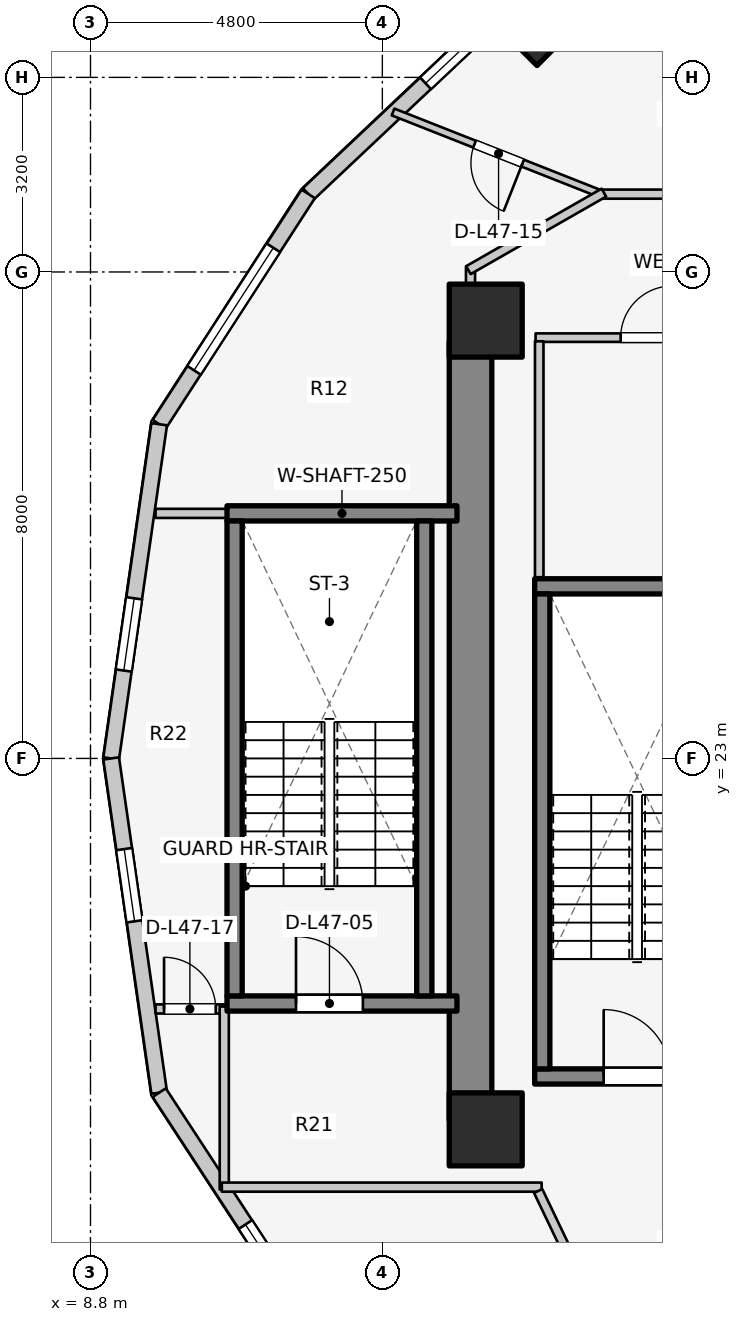
"""IFC4 building model, lengths in metres.
Left out: names, types, materials, properties, quantities, classifications, styles, units other than length and angle.
Written with IfcOpenShell. Run it as: python <this file> out.ifc"""

import sys

from ifc_helpers import new_model, si_unit, direction, frame, frame_2d, origin, origin_2d, place, context, subcontext, project, spatial, rectangle, extrude, element, fill, save


model = new_model("IFC4")
c1 = context("Model", 3, precision=1e-05, world=origin(), true_north=direction((0.0, 1.0)))
c2 = subcontext(c1, "Body", "Model", "MODEL_VIEW")
j1 = project(units=[si_unit("LENGTHUNIT", "METRE"), si_unit("PLANEANGLEUNIT", "RADIAN")], contexts=[c1])
p1 = place(None, origin())
s1 = spatial("IfcSite", under=j1, at=p1, CompositionType="ELEMENT")
p2 = place(p1, origin())
s2 = spatial("IfcBuilding", under=s1, at=p2, CompositionType="ELEMENT")
p3 = place(p2, frame((0.0, 0.0, 156.0)))
s3 = spatial("IfcBuildingStorey", under=s2, at=p3, CompositionType="ELEMENT", Elevation=156.0)
p4 = place(p3, frame((15.05, 17.05, 0.0), z_axis=(0.0, 0.0, 1.0), x_axis=(0.0, 1.0, 0.0)))
e1 = element("IfcWall", 1, at=p4, inside=s3, PredefinedType="SHEAR", context=c2, shape_type="SweptSolid", body=[
    extrude(rectangle(XDim=12.8, YDim=0.7, at=frame_2d((6.4, 0.0))), origin(), (0.0, 0.0, 1.0), 3.1),
])
p5 = place(p3, frame((16.105, 17.77, 0.0), z_axis=(0.0, 0.0, 1.0), x_axis=(1.0, 0.0, 0.0)))
e2 = element("IfcWall", 2, at=p5, inside=s3, PredefinedType="SOLIDWALL", context=c2, shape_type="SweptSolid", body=[
    extrude(rectangle(XDim=3.37, YDim=0.25, at=frame_2d((1.685, 0.0))), origin(), (0.0, 0.0, 1.0), 3.1),
])
p6 = place(p5, frame((1.135, 0.0, 0.0)))
e3 = element("IfcOpeningElement", 3, at=p6, cuts=e2, PredefinedType="OPENING", context=c2, shape_type="SweptSolid", body=[
    extrude(rectangle(XDim=1.1, YDim=2.1, at=frame_2d((0.55, 1.05))), frame((0.0, 0.135, 0.0), z_axis=(0.0, -1.0, 0.0), x_axis=(1.0, 0.0, 0.0)), (0.0, 0.0, 1.0), 0.27),
])
p7 = place(p3, frame((16.105, 25.83, 0.0), z_axis=(0.0, 0.0, 1.0), x_axis=(1.0, 0.0, 0.0)))
e4 = element("IfcWall", 4, at=p7, inside=s3, PredefinedType="SOLIDWALL", context=c2, shape_type="SweptSolid", body=[
    extrude(rectangle(XDim=3.37, YDim=0.25, at=frame_2d((1.685, 0.0))), origin(), (0.0, 0.0, 1.0), 3.1),
])
p8 = place(p3, frame((16.23, 17.895, 0.0), z_axis=(0.0, 0.0, 1.0), x_axis=(0.0, 1.0, 0.0)))
e5 = element("IfcWall", 5, at=p8, inside=s3, PredefinedType="SOLIDWALL", context=c2, shape_type="SweptSolid", body=[
    extrude(rectangle(XDim=7.81, YDim=0.25, at=frame_2d((3.905, 0.0))), origin(), (0.0, 0.0, 1.0), 3.1),
])
p9 = place(p3, frame((11.045, 18.97, 0.0), z_axis=(0.0, 0.0, 1.0), x_axis=(1.0, 0.0, 0.0)))
e6 = element("IfcWall", 6, at=p9, inside=s3, PredefinedType="SOLIDWALL", context=c2, shape_type="SweptSolid", body=[
    extrude(rectangle(XDim=3.782, YDim=0.25, at=frame_2d((1.891, 0.0))), origin(), (0.0, 0.0, 1.0), 3.1),
])
p10 = place(p9, frame((1.135, 0.0, 0.0)))
e7 = element("IfcOpeningElement", 7, at=p10, cuts=e6, PredefinedType="OPENING", context=c2, shape_type="SweptSolid", body=[
    extrude(rectangle(XDim=1.1, YDim=2.1, at=frame_2d((0.55, 1.05))), frame((0.0, 0.135, 0.0), z_axis=(0.0, -1.0, 0.0), x_axis=(1.0, 0.0, 0.0)), (0.0, 0.0, 1.0), 0.27),
])
p11 = place(p3, frame((11.045, 27.03, 0.0), z_axis=(0.0, 0.0, 1.0), x_axis=(1.0, 0.0, 0.0)))
e8 = element("IfcWall", 8, at=p11, inside=s3, PredefinedType="SOLIDWALL", context=c2, shape_type="SweptSolid", body=[
    extrude(rectangle(XDim=3.782, YDim=0.25, at=frame_2d((1.891, 0.0))), origin(), (0.0, 0.0, 1.0), 3.1),
])
for number, where, z_axis, x_axis in (
    (9, (11.17, 19.095, 0.0), (0.0, 0.0, 1.0), (0.0, 1.0, 0.0)),
    (10, (14.29, 19.095, 0.0), (0.0, 0.0, 1.0), (0.0, 1.0, 0.0)),
):
    element("IfcWall", number, at=place(p3, frame(where, z_axis=z_axis, x_axis=x_axis)), inside=s3, PredefinedType="SOLIDWALL", context=c2, shape_type="SweptSolid", body=[
        extrude(rectangle(XDim=7.81, YDim=0.25, at=frame_2d((3.905, 0.0))), origin(), (0.0, 0.0, 1.0), 3.1),
    ])
for number, where, z_axis, x_axis in (
    (11, (15.3, 16.9, 0.0), (0.0, 0.0, 1.0), (1.0, 0.0, 0.0)),
    (12, (15.3, 30.2, 0.0), (0.0, 0.0, 1.0), (1.0, 0.0, 0.0)),
):
    element("IfcColumn", number, at=place(p3, frame(where, z_axis=z_axis, x_axis=x_axis)), inside=s3, PredefinedType="COLUMN", context=c2, shape_type="SweptSolid", body=[
        extrude(rectangle(XDim=1.2, YDim=1.2, at=origin_2d()), origin(), (0.0, 0.0, 1.0), 3.1),
    ])
p12 = place(p3, frame((16.143, 35.031, 0.0), z_axis=(0.0, 0.0, 1.0), x_axis=(-0.707106781187, 0.707106781187, 0.0)))
e13 = element("IfcColumn", 13, at=p12, inside=s3, PredefinedType="COLUMN", context=c2, shape_type="SweptSolid", body=[
    extrude(rectangle(XDim=0.9, YDim=0.9, at=origin_2d()), origin(), (0.0, 0.0, 1.0), 3.1),
])
p13 = place(p3, frame((15.731, 35.441, 0.0), z_axis=(0.0, 0.0, 1.0), x_axis=(-0.727667301037, -0.68593024354, 0.0)))
e14 = element("IfcWall", 14, at=p13, inside=s3, PredefinedType="STANDARD", context=c2, shape_type="SweptSolid", body=[
    extrude(rectangle(XDim=4.604, YDim=0.26, at=frame_2d((2.302, 0.0))), origin(), (0.0, 0.0, 1.0), 2.85),
])
p14 = place(p13, frame((0.751, 0.0, 0.75)))
e15 = element("IfcOpeningElement", 15, at=p14, cuts=e14, PredefinedType="OPENING", context=c2, shape_type="SweptSolid", body=[
    extrude(rectangle(XDim=1.2, YDim=1.5, at=frame_2d((0.6, 0.75))), frame((0.0, 0.14, 0.0), z_axis=(0.0, -1.0, 0.0), x_axis=(1.0, 0.0, 0.0)), (0.0, 0.0, 1.0), 0.28),
])
p15 = place(p3, frame((12.381, 32.284, 0.0), z_axis=(0.0, 0.0, 1.0), x_axis=(-0.543358984534, -0.839500454989, 0.0)))
e16 = element("IfcWall", 16, at=p15, inside=s3, PredefinedType="STANDARD", context=c2, shape_type="SweptSolid", body=[
    extrude(rectangle(XDim=4.511, YDim=0.26, at=frame_2d((2.256, 0.0))), origin(), (0.0, 0.0, 1.0), 2.85),
])
p16 = place(p15, frame((1.056, 0.0, 0.75)))
e17 = element("IfcOpeningElement", 17, at=p16, cuts=e16, PredefinedType="OPENING", context=c2, shape_type="SweptSolid", body=[
    extrude(rectangle(XDim=2.4, YDim=1.7, at=frame_2d((1.2, 0.85))), frame((0.0, 0.14, 0.0), z_axis=(0.0, -1.0, 0.0), x_axis=(1.0, 0.0, 0.0)), (0.0, 0.0, 1.0), 0.28),
])
p17 = place(p3, frame((9.93, 28.497, 0.0), z_axis=(0.0, 0.0, 1.0), x_axis=(-0.142227632286, -0.989833976288, 0.0)))
e18 = element("IfcWall", 18, at=p17, inside=s3, PredefinedType="STANDARD", context=c2, shape_type="SweptSolid", body=[
    extrude(rectangle(XDim=5.553, YDim=0.26, at=frame_2d((2.776, 0.0))), origin(), (0.0, 0.0, 1.0), 2.85),
])
p18 = place(p17, frame((2.892, 0.0, 0.75)))
e19 = element("IfcOpeningElement", 19, at=p18, cuts=e18, PredefinedType="OPENING", context=c2, shape_type="SweptSolid", body=[
    extrude(rectangle(XDim=1.2, YDim=1.5, at=frame_2d((0.6, 0.75))), frame((0.0, 0.14, 0.0), z_axis=(0.0, -1.0, 0.0), x_axis=(1.0, 0.0, 0.0)), (0.0, 0.0, 1.0), 0.28),
])
p19 = place(p3, frame((9.14, 23.0, 0.0), z_axis=(0.0, 0.0, 1.0), x_axis=(0.142227632286, -0.989833976288, 0.0)))
e20 = element("IfcWall", 20, at=p19, inside=s3, PredefinedType="STANDARD", context=c2, shape_type="SweptSolid", body=[
    extrude(rectangle(XDim=5.553, YDim=0.26, at=frame_2d((2.776, 0.0))), origin(), (0.0, 0.0, 1.0), 2.85),
])
p20 = place(p19, frame((1.506, 0.0, 0.75)))
e21 = element("IfcOpeningElement", 21, at=p20, cuts=e20, PredefinedType="OPENING", context=c2, shape_type="SweptSolid", body=[
    extrude(rectangle(XDim=1.2, YDim=1.5, at=frame_2d((0.6, 0.75))), frame((0.0, 0.14, 0.0), z_axis=(0.0, -1.0, 0.0), x_axis=(1.0, 0.0, 0.0)), (0.0, 0.0, 1.0), 0.28),
])
p21 = place(p3, frame((9.93, 17.503, 0.0), z_axis=(0.0, 0.0, 1.0), x_axis=(0.547456494366, -0.836834145322, 0.0)))
e22 = element("IfcWall", 22, at=p21, inside=s3, PredefinedType="STANDARD", context=c2, shape_type="SweptSolid", body=[
    extrude(rectangle(XDim=4.477, YDim=0.26, at=frame_2d((2.239, 0.0))), origin(), (0.0, 0.0, 1.0), 2.85),
])
p22 = place(p21, frame((2.591, 0.0, 0.75)))
e23 = element("IfcOpeningElement", 23, at=p22, cuts=e22, PredefinedType="OPENING", context=c2, shape_type="SweptSolid", body=[
    extrude(rectangle(XDim=1.2, YDim=1.5, at=frame_2d((0.6, 0.75))), frame((0.0, 0.14, 0.0), z_axis=(0.0, -1.0, 0.0), x_axis=(1.0, 0.0, 0.0)), (0.0, 0.0, 1.0), 0.28),
])
p23 = place(p3, frame((16.12, 29.92, 0.0), z_axis=(0.0, 0.0, 1.0), x_axis=(1.0, 0.0, 0.0)))
e24 = element("IfcWall", 24, at=p23, inside=s3, PredefinedType="PLUMBINGWALL", context=c2, shape_type="SweptSolid", body=[
    extrude(rectangle(XDim=3.3, YDim=0.14, at=frame_2d((1.65, 0.0))), origin(), (0.0, 0.0, 1.0), 2.855),
])
p24 = place(p23, frame((1.399, 0.0, 0.0)))
e25 = element("IfcOpeningElement", 25, at=p24, cuts=e24, PredefinedType="OPENING", context=c2, shape_type="SweptSolid", body=[
    extrude(rectangle(XDim=0.85, YDim=2.05, at=frame_2d((0.425, 1.025))), frame((0.0, 0.08, 0.0), z_axis=(0.0, -1.0, 0.0), x_axis=(1.0, 0.0, 0.0)), (0.0, 0.0, 1.0), 0.16),
])
p25 = place(p3, frame((16.18, 25.98, 0.0), z_axis=(0.0, 0.0, 1.0), x_axis=(0.0, 1.0, 0.0)))
e26 = element("IfcWall", 26, at=p25, inside=s3, PredefinedType="PLUMBINGWALL", context=c2, shape_type="SweptSolid", body=[
    extrude(rectangle(XDim=3.88, YDim=0.14, at=frame_2d((1.94, 0.0))), origin(), (0.0, 0.0, 1.0), 2.855),
])
p26 = place(p3, frame((9.87, 27.03, 0.0), z_axis=(0.0, 0.0, 1.0), x_axis=(1.0, 0.0, 0.0)))
e27 = element("IfcWall", 27, at=p26, inside=s3, PredefinedType="PARTITIONING", context=c2, shape_type="SweptSolid", body=[
    extrude(rectangle(XDim=1.17, YDim=0.15, at=frame_2d((0.585, 0.0))), origin(), (0.0, 0.0, 1.0), 2.855),
])
p27 = place(p3, frame((15.05, 29.8, 0.0), z_axis=(0.0, 0.0, 1.0), x_axis=(0.0, 1.0, 0.0)))
e28 = element("IfcWall", 28, at=p27, inside=s3, PredefinedType="PARTITIONING", context=c2, shape_type="SweptSolid", body=[
    extrude(rectangle(XDim=1.29, YDim=0.15, at=frame_2d((0.645, 0.0))), origin(), (0.0, 0.0, 1.0), 2.855),
])
p28 = place(p3, frame((17.247, 32.262, 0.0), z_axis=(0.0, 0.0, 1.0), x_axis=(-0.930204027108, 0.367042869367, 0.0)))
e29 = element("IfcWall", 29, at=p28, inside=s3, PredefinedType="MOVABLE", context=c2, shape_type="SweptSolid", body=[
    extrude(rectangle(XDim=3.731, YDim=0.12, at=frame_2d((1.865, 0.0))), origin(), (0.0, 0.0, 1.0), 2.22),
])
p29 = place(p28, frame((1.44, 0.0, 0.0)))
e30 = element("IfcOpeningElement", 30, at=p29, cuts=e29, PredefinedType="OPENING", context=c2, shape_type="SweptSolid", body=[
    extrude(rectangle(XDim=0.85, YDim=2.05, at=frame_2d((0.425, 1.025))), frame((0.0, 0.07, 0.0), z_axis=(0.0, -1.0, 0.0), x_axis=(1.0, 0.0, 0.0)), (0.0, 0.0, 1.0), 0.14),
])
p30 = place(p3, frame((17.15, 32.28, 0.0), z_axis=(0.0, 0.0, 1.0), x_axis=(1.0, 0.0, 0.0)))
e31 = element("IfcWall", 31, at=p30, inside=s3, PredefinedType="PARTITIONING", context=c2, shape_type="SweptSolid", body=[
    extrude(rectangle(XDim=7.52, YDim=0.15, at=frame_2d((3.76, 0.0))), origin(), (0.0, 0.0, 1.0), 2.299),
])
p31 = place(p30, frame((1.3, 0.0, 0.0)))
e32 = element("IfcOpeningElement", 32, at=p31, cuts=e31, PredefinedType="OPENING", context=c2, shape_type="SweptSolid", body=[
    extrude(rectangle(XDim=0.9, YDim=2.1, at=frame_2d((0.45, 1.05))), frame((0.0, 0.085, 0.0), z_axis=(0.0, -1.0, 0.0), x_axis=(1.0, 0.0, 0.0)), (0.0, 0.0, 1.0), 0.17),
])
p32 = place(p3, frame((17.243, 32.305, 0.0), z_axis=(0.0, 0.0, 1.0), x_axis=(-0.867991349648, -0.496579315857, 0.0)))
e33 = element("IfcWall", 33, at=p32, inside=s3, PredefinedType="PARTITIONING", context=c2, shape_type="SweptSolid", body=[
    extrude(rectangle(XDim=2.567, YDim=0.15, at=frame_2d((1.283, 0.0))), origin(), (0.0, 0.0, 1.0), 2.22),
])
p33 = place(p3, frame((9.87, 18.88, 0.0), z_axis=(0.0, 0.0, 1.0), x_axis=(1.0, 0.0, 0.0)))
e34 = element("IfcWall", 34, at=p33, inside=s3, PredefinedType="PARTITIONING", context=c2, shape_type="SweptSolid", body=[
    extrude(rectangle(XDim=1.17, YDim=0.15, at=frame_2d((0.585, 0.0))), origin(), (0.0, 0.0, 1.0), 2.855),
])
p34 = place(p33, frame((0.14, 0.0, 0.0)))
e35 = element("IfcOpeningElement", 35, at=p34, cuts=e34, PredefinedType="OPENING", context=c2, shape_type="SweptSolid", body=[
    extrude(rectangle(XDim=0.85, YDim=2.05, at=frame_2d((0.425, 1.025))), frame((0.0, 0.085, 0.0), z_axis=(0.0, -1.0, 0.0), x_axis=(1.0, 0.0, 0.0)), (0.0, 0.0, 1.0), 0.17),
])
p35 = place(p3, frame((11.0, 15.91, 0.0), z_axis=(0.0, 0.0, 1.0), x_axis=(0.0, 1.0, 0.0)))
e36 = element("IfcWall", 36, at=p35, inside=s3, PredefinedType="PARTITIONING", context=c2, shape_type="SweptSolid", body=[
    extrude(rectangle(XDim=3.01, YDim=0.15, at=frame_2d((1.505, 0.0))), origin(), (0.0, 0.0, 1.0), 2.855),
])
p36 = place(p3, frame((10.96, 15.95, 0.0), z_axis=(0.0, 0.0, 1.0), x_axis=(1.0, 0.0, 0.0)))
e37 = element("IfcWall", 37, at=p36, inside=s3, PredefinedType="PARTITIONING", context=c2, shape_type="SweptSolid", body=[
    extrude(rectangle(XDim=5.26, YDim=0.15, at=frame_2d((2.63, 0.0))), origin(), (0.0, 0.0, 1.0), 2.22),
])
p37 = place(p3, frame((17.222, 13.675, 0.0), z_axis=(0.0, 0.0, 1.0), x_axis=(-0.431973389813, 0.901886351207, 0.0)))
e38 = element("IfcWall", 38, at=p37, inside=s3, PredefinedType="PARTITIONING", context=c2, shape_type="SweptSolid", body=[
    extrude(rectangle(XDim=2.452, YDim=0.15, at=frame_2d((1.226, 0.0))), origin(), (0.0, 0.0, 1.0), 2.855),
])
p38 = place(p14, origin())
e39 = element("IfcWindow", 39, at=p38, inside=s3, PartitioningType="SINGLE_PANEL", PredefinedType="WINDOW", context=c2, shape_type="SweptSolid", body=[
    extrude(rectangle(XDim=1.2, YDim=1.5, at=frame_2d((0.6, 0.75))), frame((0.0, 0.03, 0.0), z_axis=(0.0, -1.0, 0.0), x_axis=(1.0, 0.0, 0.0)), (0.0, 0.0, 1.0), 0.06),
])
fill(e15, e39)
p39 = place(p16, origin())
e40 = element("IfcWindow", 40, at=p39, inside=s3, PartitioningType="SINGLE_PANEL", PredefinedType="WINDOW", context=c2, shape_type="SweptSolid", body=[
    extrude(rectangle(XDim=2.4, YDim=1.7, at=frame_2d((1.2, 0.85))), frame((0.0, 0.03, 0.0), z_axis=(0.0, -1.0, 0.0), x_axis=(1.0, 0.0, 0.0)), (0.0, 0.0, 1.0), 0.06),
])
fill(e17, e40)
p40 = place(p18, origin())
e41 = element("IfcWindow", 41, at=p40, inside=s3, PartitioningType="SINGLE_PANEL", PredefinedType="WINDOW", context=c2, shape_type="SweptSolid", body=[
    extrude(rectangle(XDim=1.2, YDim=1.5, at=frame_2d((0.6, 0.75))), frame((0.0, 0.03, 0.0), z_axis=(0.0, -1.0, 0.0), x_axis=(1.0, 0.0, 0.0)), (0.0, 0.0, 1.0), 0.06),
])
fill(e19, e41)
p41 = place(p20, origin())
e42 = element("IfcWindow", 42, at=p41, inside=s3, PartitioningType="SINGLE_PANEL", PredefinedType="WINDOW", context=c2, shape_type="SweptSolid", body=[
    extrude(rectangle(XDim=1.2, YDim=1.5, at=frame_2d((0.6, 0.75))), frame((0.0, 0.03, 0.0), z_axis=(0.0, -1.0, 0.0), x_axis=(1.0, 0.0, 0.0)), (0.0, 0.0, 1.0), 0.06),
])
fill(e21, e42)
p42 = place(p22, origin())
e43 = element("IfcWindow", 43, at=p42, inside=s3, PartitioningType="SINGLE_PANEL", PredefinedType="WINDOW", context=c2, shape_type="SweptSolid", body=[
    extrude(rectangle(XDim=1.2, YDim=1.5, at=frame_2d((0.6, 0.75))), frame((0.0, 0.03, 0.0), z_axis=(0.0, -1.0, 0.0), x_axis=(1.0, 0.0, 0.0)), (0.0, 0.0, 1.0), 0.06),
])
fill(e23, e43)
p43 = place(p6, origin())
e44 = element("IfcDoor", 44, at=p43, inside=s3, OperationType="SINGLE_SWING_LEFT", PredefinedType="DOOR", context=c2, shape_type="SweptSolid", body=[
    extrude(rectangle(XDim=1.1, YDim=2.1, at=frame_2d((0.55, 1.05))), frame((0.0, 0.025, 0.0), z_axis=(0.0, -1.0, 0.0), x_axis=(1.0, 0.0, 0.0)), (0.0, 0.0, 1.0), 0.05),
])
fill(e3, e44)
p44 = place(p10, origin())
e45 = element("IfcDoor", 45, at=p44, inside=s3, OperationType="SINGLE_SWING_LEFT", PredefinedType="DOOR", context=c2, shape_type="SweptSolid", body=[
    extrude(rectangle(XDim=1.1, YDim=2.1, at=frame_2d((0.55, 1.05))), frame((0.0, 0.025, 0.0), z_axis=(0.0, -1.0, 0.0), x_axis=(1.0, 0.0, 0.0)), (0.0, 0.0, 1.0), 0.05),
])
fill(e7, e45)
p45 = place(p24, origin())
e46 = element("IfcDoor", 46, at=p45, inside=s3, OperationType="SINGLE_SWING_RIGHT", PredefinedType="DOOR", context=c2, shape_type="SweptSolid", body=[
    extrude(rectangle(XDim=0.85, YDim=2.05, at=frame_2d((0.425, 1.025))), frame((0.0, 0.025, 0.0), z_axis=(0.0, -1.0, 0.0), x_axis=(1.0, 0.0, 0.0)), (0.0, 0.0, 1.0), 0.05),
])
fill(e25, e46)
p46 = place(p29, origin())
e47 = element("IfcDoor", 47, at=p46, inside=s3, OperationType="SINGLE_SWING_LEFT", PredefinedType="DOOR", context=c2, shape_type="SweptSolid", body=[
    extrude(rectangle(XDim=0.85, YDim=2.05, at=frame_2d((0.425, 1.025))), frame((0.0, 0.025, 0.0), z_axis=(0.0, -1.0, 0.0), x_axis=(1.0, 0.0, 0.0)), (0.0, 0.0, 1.0), 0.05),
])
fill(e30, e47)
p47 = place(p34, origin())
e48 = element("IfcDoor", 48, at=p47, inside=s3, OperationType="SINGLE_SWING_LEFT", PredefinedType="DOOR", context=c2, shape_type="SweptSolid", body=[
    extrude(rectangle(XDim=0.85, YDim=2.05, at=frame_2d((0.425, 1.025))), frame((0.0, 0.025, 0.0), z_axis=(0.0, -1.0, 0.0), x_axis=(1.0, 0.0, 0.0)), (0.0, 0.0, 1.0), 0.05),
])
fill(e35, e48)
save(model, sys.argv[1])
